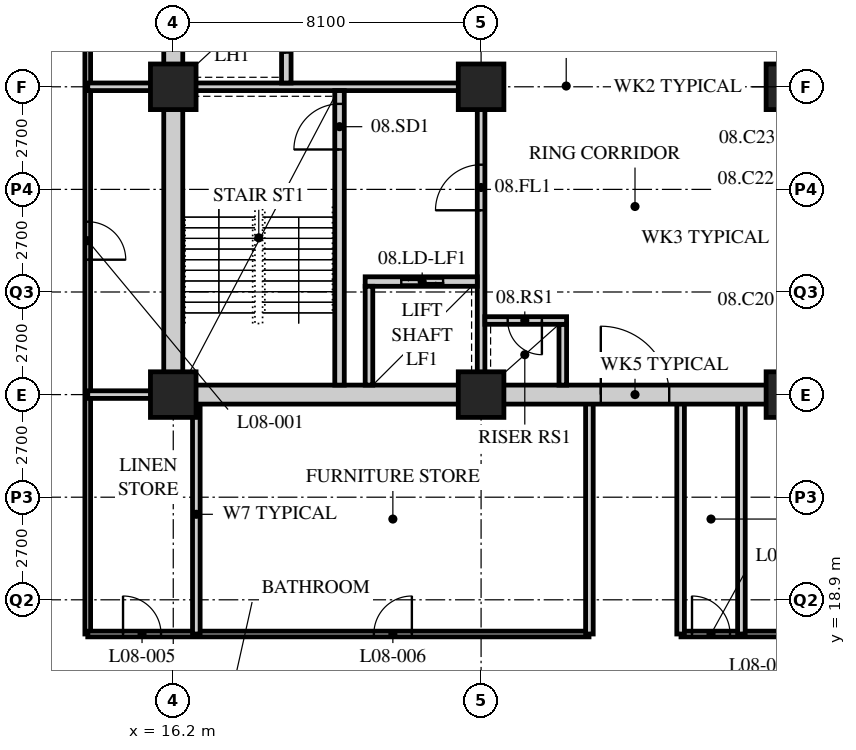
"""IFC4 building model, lengths in metres.
Left out: names, types, materials, properties, quantities, classifications, styles, units other than length and angle.
Written with IfcOpenShell. Run it as: python <this file> out.ifc"""

import sys

from ifc_helpers import new_model, si_unit, direction, frame, frame_2d, origin, origin_2d, place, context, subcontext, project, spatial, rectangle, hollow_rectangle, extrude, element, fill, save


model = new_model("IFC4")
c1 = context("Model", 3, precision=1e-05, world=origin(), true_north=direction((0.0, 1.0)))
c2 = subcontext(c1, "Body", "Model", "MODEL_VIEW")
j1 = project(units=[si_unit("LENGTHUNIT", "METRE"), si_unit("PLANEANGLEUNIT", "RADIAN")], contexts=[c1])
p1 = place(None, origin())
s1 = spatial("IfcSite", under=j1, at=p1, CompositionType="ELEMENT")
p2 = place(p1, origin())
s2 = spatial("IfcBuilding", under=s1, at=p2, CompositionType="ELEMENT")
p3 = place(p2, frame((0.0, 0.0, 39.8)))
s3 = spatial("IfcBuildingStorey", under=s2, at=p3, CompositionType="ELEMENT", Elevation=39.8)
for number, where, z_axis, x_axis in (
    (1, (16.2, 24.3, 0.0), (0.0, 0.0, 1.0), (1.0, 0.0, 0.0)),
    (2, (16.2, 32.4, 0.0), (0.0, 0.0, 1.0), (1.0, 0.0, 0.0)),
    (3, (24.3, 24.3, 0.0), (0.0, 0.0, 1.0), (1.0, 0.0, 0.0)),
    (4, (24.3, 32.4, 0.0), (0.0, 0.0, 1.0), (1.0, 0.0, 0.0)),
    (5, (32.4, 24.3, 0.0), (0.0, 0.0, 1.0), (1.0, 0.0, 0.0)),
    (6, (32.4, 32.4, 0.0), (0.0, 0.0, 1.0), (1.0, 0.0, 0.0)),
):
    element("IfcColumn", number, at=place(p3, frame(where, z_axis=z_axis, x_axis=x_axis)), inside=s3, PredefinedType="COLUMN", context=c2, shape_type="SweptSolid", body=[
        extrude(hollow_rectangle(XDim=1.2, YDim=1.2, WallThickness=0.12, at=origin_2d()), origin(), (0.0, 0.0, 1.0), 3.4),
    ])
p4 = place(p3, frame((13.95, 40.5, 0.0), z_axis=(0.0, 0.0, 1.0), x_axis=(0.0, -1.0, 0.0)))
e7 = element("IfcWall", 7, at=p4, inside=s3, PredefinedType="PARTITIONING", context=c2, shape_type="SweptSolid", body=[
    extrude(rectangle(XDim=22.5, YDim=0.15, at=frame_2d((11.25, 0.0))), origin(), (0.0, 0.0, 1.0), 3.19),
])
p5 = place(p4, frame((11.65, 0.0, 0.0)))
e8 = element("IfcOpeningElement", 8, at=p5, cuts=e7, PredefinedType="OPENING", context=c2, shape_type="SweptSolid", body=[
    extrude(rectangle(XDim=1.0, YDim=2.1, at=frame_2d((0.5, 1.05))), frame((0.0, 0.085, 0.0), z_axis=(0.0, -1.0, 0.0), x_axis=(1.0, 0.0, 0.0)), (0.0, 0.0, 1.0), 0.17),
])
p6 = place(p4, frame((3.55, 0.0, 0.0)))
e9 = element("IfcOpeningElement", 9, at=p6, cuts=e7, PredefinedType="OPENING", context=c2, shape_type="SweptSolid", body=[
    extrude(rectangle(XDim=1.0, YDim=2.1, at=frame_2d((0.5, 1.05))), frame((0.0, 0.085, 0.0), z_axis=(0.0, -1.0, 0.0), x_axis=(1.0, 0.0, 0.0)), (0.0, 0.0, 1.0), 0.17),
])
p7 = place(p3, frame((13.95, 18.0, 0.0), z_axis=(0.0, 0.0, 1.0), x_axis=(1.0, 0.0, 0.0)))
e10 = element("IfcWall", 10, at=p7, inside=s3, PredefinedType="PARTITIONING", context=c2, shape_type="SweptSolid", body=[
    extrude(rectangle(XDim=13.19, YDim=0.15, at=frame_2d((6.595, 0.0))), origin(), (0.0, 0.0, 1.0), 3.19),
])
p8 = place(p7, frame((0.929, 0.0, 0.0)))
e11 = element("IfcOpeningElement", 11, at=p8, cuts=e10, PredefinedType="OPENING", context=c2, shape_type="SweptSolid", body=[
    extrude(rectangle(XDim=1.0, YDim=2.1, at=frame_2d((0.5, 1.05))), frame((0.0, 0.085, 0.0), z_axis=(0.0, -1.0, 0.0), x_axis=(1.0, 0.0, 0.0)), (0.0, 0.0, 1.0), 0.17),
])
p9 = place(p7, frame((7.529, 0.0, 0.0)))
e12 = element("IfcOpeningElement", 12, at=p9, cuts=e10, PredefinedType="OPENING", context=c2, shape_type="SweptSolid", body=[
    extrude(rectangle(XDim=1.0, YDim=2.1, at=frame_2d((0.5, 1.05))), frame((0.0, 0.085, 0.0), z_axis=(0.0, -1.0, 0.0), x_axis=(1.0, 0.0, 0.0)), (0.0, 0.0, 1.0), 0.17),
])
p10 = place(p3, frame((29.56, 18.0, 0.0), z_axis=(0.0, 0.0, 1.0), x_axis=(1.0, 0.0, 0.0)))
e13 = element("IfcWall", 13, at=p10, inside=s3, PredefinedType="PARTITIONING", context=c2, shape_type="SweptSolid", body=[
    extrude(rectangle(XDim=13.19, YDim=0.15, at=frame_2d((6.595, 0.0))), origin(), (0.0, 0.0, 1.0), 3.19),
])
p11 = place(p10, frame((0.29, 0.0, 0.0)))
e14 = element("IfcOpeningElement", 14, at=p11, cuts=e13, PredefinedType="OPENING", context=c2, shape_type="SweptSolid", body=[
    extrude(rectangle(XDim=1.0, YDim=2.1, at=frame_2d((0.5, 1.05))), frame((0.0, 0.085, 0.0), z_axis=(0.0, -1.0, 0.0), x_axis=(1.0, 0.0, 0.0)), (0.0, 0.0, 1.0), 0.17),
])
p12 = place(p10, frame((6.89, 0.0, 0.0)))
e15 = element("IfcOpeningElement", 15, at=p12, cuts=e13, PredefinedType="OPENING", context=c2, shape_type="SweptSolid", body=[
    extrude(rectangle(XDim=1.0, YDim=2.1, at=frame_2d((0.5, 1.05))), frame((0.0, 0.085, 0.0), z_axis=(0.0, -1.0, 0.0), x_axis=(1.0, 0.0, 0.0)), (0.0, 0.0, 1.0), 0.17),
])
p13 = place(p3, frame((13.95, 32.4, 0.0), z_axis=(0.0, 0.0, 1.0), x_axis=(1.0, 0.0, 0.0)))
e16 = element("IfcWall", 16, at=p13, inside=s3, PredefinedType="SOLIDWALL", context=c2, shape_type="SweptSolid", body=[
    extrude(rectangle(XDim=2.25, YDim=0.2, at=frame_2d((1.125, 0.0))), origin(), (0.0, 0.0, 1.0), 2.578),
])
for number, where, z_axis, x_axis in (
    (17, (16.807, 18.0, 0.0), (0.0, 0.0, 1.0), (0.0, 1.0, 0.0)),
    (18, (31.15, 18.0, 0.0), (0.0, 0.0, 1.0), (0.0, 1.0, 0.0)),
    (19, (27.15, 18.0, 0.0), (0.0, 0.0, 1.0), (0.0, 1.0, 0.0)),
    (20, (29.55, 18.0, 0.0), (0.0, 0.0, 1.0), (0.0, 1.0, 0.0)),
):
    element("IfcWall", number, at=place(p3, frame(where, z_axis=z_axis, x_axis=x_axis)), inside=s3, PredefinedType="SOLIDWALL", context=c2, shape_type="SweptSolid", body=[
        extrude(rectangle(XDim=6.3, YDim=0.2, at=frame_2d((3.15, 0.0))), origin(), (0.0, 0.0, 1.0), 3.19),
    ])
p14 = place(p3, frame((13.95, 24.3, 0.0), z_axis=(0.0, 0.0, 1.0), x_axis=(1.0, 0.0, 0.0)))
e21 = element("IfcWall", 21, at=p14, inside=s3, PredefinedType="SOLIDWALL", context=c2, shape_type="SweptSolid", body=[
    extrude(rectangle(XDim=2.25, YDim=0.2, at=frame_2d((1.125, 0.0))), origin(), (0.0, 0.0, 1.0), 2.578),
])
p15 = place(p3, frame((15.95, 24.3, 0.0), z_axis=(0.0, 0.0, 1.0), x_axis=(1.0, 0.0, 0.0)))
e22 = element("IfcWall", 22, at=p15, inside=s3, PredefinedType="SOLIDWALL", context=c2, shape_type="SweptSolid", body=[
    extrude(rectangle(XDim=24.8, YDim=0.5, at=frame_2d((12.4, 0.0))), origin(), (0.0, 0.0, 1.0), 2.54),
])
p16 = place(p15, frame((11.5, 0.0, 0.0)))
e23 = element("IfcOpeningElement", 23, at=p16, cuts=e22, PredefinedType="OPENING", context=c2, shape_type="SweptSolid", body=[
    extrude(rectangle(XDim=1.8, YDim=2.4, at=frame_2d((0.9, 1.2))), frame((0.0, 0.26, 0.0), z_axis=(0.0, -1.0, 0.0), x_axis=(1.0, 0.0, 0.0)), (0.0, 0.0, 1.0), 0.52),
])
p17 = place(p3, frame((16.2, 24.55, 0.0), z_axis=(0.0, 0.0, 1.0), x_axis=(0.0, 1.0, 0.0)))
e24 = element("IfcWall", 24, at=p17, inside=s3, PredefinedType="SOLIDWALL", context=c2, shape_type="SweptSolid", body=[
    extrude(rectangle(XDim=15.7, YDim=0.5, at=frame_2d((7.85, 0.0))), origin(), (0.0, 0.0, 1.0), 2.578),
])
p18 = place(p3, frame((16.45, 32.4, 0.0), z_axis=(0.0, 0.0, 1.0), x_axis=(1.0, 0.0, 0.0)))
e25 = element("IfcWall", 25, at=p18, inside=s3, PredefinedType="SOLIDWALL", context=c2, shape_type="SweptSolid", body=[
    extrude(rectangle(XDim=7.95, YDim=0.2, at=frame_2d((3.975, 0.0))), origin(), (0.0, 0.0, 1.0), 2.578),
])
p19 = place(p3, frame((24.3, 24.55, 0.0), z_axis=(0.0, 0.0, 1.0), x_axis=(0.0, 1.0, 0.0)))
e26 = element("IfcWall", 26, at=p19, inside=s3, PredefinedType="SOLIDWALL", context=c2, shape_type="SweptSolid", body=[
    extrude(rectangle(XDim=7.75, YDim=0.2, at=frame_2d((3.875, 0.0))), origin(), (0.0, 0.0, 1.0), 2.578),
])
p20 = place(p19, frame((4.6, 0.0, 0.0)))
e27 = element("IfcOpeningElement", 27, at=p20, cuts=e26, PredefinedType="OPENING", context=c2, shape_type="SweptSolid", body=[
    extrude(rectangle(XDim=1.2, YDim=2.1, at=frame_2d((0.6, 1.05))), frame((0.0, 0.11, 0.0), z_axis=(0.0, -1.0, 0.0), x_axis=(1.0, 0.0, 0.0)), (0.0, 0.0, 1.0), 0.22),
])
p21 = place(p3, frame((20.575, 24.55, 0.0), z_axis=(0.0, 0.0, 1.0), x_axis=(0.0, 1.0, 0.0)))
e28 = element("IfcWall", 28, at=p21, inside=s3, PredefinedType="SOLIDWALL", context=c2, shape_type="SweptSolid", body=[
    extrude(rectangle(XDim=7.75, YDim=0.25, at=frame_2d((3.875, 0.0))), origin(), (0.0, 0.0, 1.0), 3.19),
])
p22 = place(p21, frame((6.2, 0.0, 0.0)))
e29 = element("IfcOpeningElement", 29, at=p22, cuts=e28, PredefinedType="OPENING", context=c2, shape_type="SweptSolid", body=[
    extrude(rectangle(XDim=1.2, YDim=2.1, at=frame_2d((0.6, 1.05))), frame((0.0, 0.135, 0.0), z_axis=(0.0, -1.0, 0.0), x_axis=(1.0, 0.0, 0.0)), (0.0, 0.0, 1.0), 0.27),
])
p23 = place(p3, frame((21.25, 27.275, 0.0), z_axis=(0.0, 0.0, 1.0), x_axis=(1.0, 0.0, 0.0)))
e30 = element("IfcWall", 30, at=p23, inside=s3, PredefinedType="SOLIDWALL", context=c2, shape_type="SweptSolid", body=[
    extrude(rectangle(XDim=2.95, YDim=0.25, at=frame_2d((1.475, 0.0))), origin(), (0.0, 0.0, 1.0), 3.19),
])
p24 = place(p23, frame((0.95, 0.0, 0.0)))
e31 = element("IfcOpeningElement", 31, at=p24, cuts=e30, PredefinedType="OPENING", context=c2, shape_type="SweptSolid", body=[
    extrude(rectangle(XDim=1.1, YDim=2.4, at=frame_2d((0.55, 1.2))), frame((0.0, 0.135, 0.0), z_axis=(0.0, -1.0, 0.0), x_axis=(1.0, 0.0, 0.0)), (0.0, 0.0, 1.0), 0.27),
])
p25 = place(p3, frame((21.35, 24.55, 0.0), z_axis=(0.0, 0.0, 1.0), x_axis=(0.0, 1.0, 0.0)))
e32 = element("IfcWall", 32, at=p25, inside=s3, PredefinedType="SOLIDWALL", context=c2, shape_type="SweptSolid", body=[
    extrude(rectangle(XDim=2.6, YDim=0.2, at=frame_2d((1.3, 0.0))), origin(), (0.0, 0.0, 1.0), 3.19),
])
p26 = place(p3, frame((19.175, 32.5, 0.0), z_axis=(0.0, 0.0, 1.0), x_axis=(0.0, 1.0, 0.0)))
e33 = element("IfcWall", 33, at=p26, inside=s3, PredefinedType="SOLIDWALL", context=c2, shape_type="SweptSolid", body=[
    extrude(rectangle(XDim=7.75, YDim=0.25, at=frame_2d((3.875, 0.0))), origin(), (0.0, 0.0, 1.0), 3.19),
])
p27 = place(p26, frame((0.8, 0.0, 0.0)))
e34 = element("IfcOpeningElement", 34, at=p27, cuts=e33, PredefinedType="OPENING", context=c2, shape_type="SweptSolid", body=[
    extrude(rectangle(XDim=1.1, YDim=2.4, at=frame_2d((0.55, 1.2))), frame((0.0, 0.135, 0.0), z_axis=(0.0, -1.0, 0.0), x_axis=(1.0, 0.0, 0.0)), (0.0, 0.0, 1.0), 0.27),
])
p28 = place(p26, frame((3.4, 0.0, 0.0)))
e35 = element("IfcOpeningElement", 35, at=p28, cuts=e33, PredefinedType="OPENING", context=c2, shape_type="SweptSolid", body=[
    extrude(rectangle(XDim=1.1, YDim=2.4, at=frame_2d((0.55, 1.2))), frame((0.0, 0.135, 0.0), z_axis=(0.0, -1.0, 0.0), x_axis=(1.0, 0.0, 0.0)), (0.0, 0.0, 1.0), 0.27),
])
p29 = place(p26, frame((6.0, 0.0, 0.0)))
e36 = element("IfcOpeningElement", 36, at=p29, cuts=e33, PredefinedType="OPENING", context=c2, shape_type="SweptSolid", body=[
    extrude(rectangle(XDim=1.1, YDim=2.4, at=frame_2d((0.55, 1.2))), frame((0.0, 0.135, 0.0), z_axis=(0.0, -1.0, 0.0), x_axis=(1.0, 0.0, 0.0)), (0.0, 0.0, 1.0), 0.27),
])
p30 = place(p3, frame((26.45, 24.55, 0.0), z_axis=(0.0, 0.0, 1.0), x_axis=(0.0, 1.0, 0.0)))
e37 = element("IfcWall", 37, at=p30, inside=s3, PredefinedType="SOLIDWALL", context=c2, shape_type="SweptSolid", body=[
    extrude(rectangle(XDim=1.6, YDim=0.2, at=frame_2d((0.8, 0.0))), origin(), (0.0, 0.0, 1.0), 3.19),
])
p31 = place(p3, frame((24.4, 26.25, 0.0), z_axis=(0.0, 0.0, 1.0), x_axis=(1.0, 0.0, 0.0)))
e38 = element("IfcWall", 38, at=p31, inside=s3, PredefinedType="SOLIDWALL", context=c2, shape_type="SweptSolid", body=[
    extrude(rectangle(XDim=2.15, YDim=0.2, at=frame_2d((1.075, 0.0))), origin(), (0.0, 0.0, 1.0), 3.19),
])
p32 = place(p31, frame((0.6, 0.0, 0.0)))
e39 = element("IfcOpeningElement", 39, at=p32, cuts=e38, PredefinedType="OPENING", context=c2, shape_type="SweptSolid", body=[
    extrude(rectangle(XDim=0.9, YDim=2.1, at=frame_2d((0.45, 1.05))), frame((0.0, 0.11, 0.0), z_axis=(0.0, -1.0, 0.0), x_axis=(1.0, 0.0, 0.0)), (0.0, 0.0, 1.0), 0.22),
])
p33 = place(p5, origin())
e40 = element("IfcDoor", 40, at=p33, inside=s3, OperationType="SINGLE_SWING_RIGHT", PredefinedType="DOOR", context=c2, shape_type="SweptSolid", body=[
    extrude(rectangle(XDim=1.0, YDim=2.1, at=frame_2d((0.5, 1.05))), frame((0.0, 0.025, 0.0), z_axis=(0.0, -1.0, 0.0), x_axis=(1.0, 0.0, 0.0)), (0.0, 0.0, 1.0), 0.05),
])
fill(e8, e40)
p34 = place(p8, origin())
e41 = element("IfcDoor", 41, at=p34, inside=s3, OperationType="SINGLE_SWING_LEFT", PredefinedType="DOOR", context=c2, shape_type="SweptSolid", body=[
    extrude(rectangle(XDim=1.0, YDim=2.1, at=frame_2d((0.5, 1.05))), frame((0.0, 0.025, 0.0), z_axis=(0.0, -1.0, 0.0), x_axis=(1.0, 0.0, 0.0)), (0.0, 0.0, 1.0), 0.05),
])
fill(e11, e41)
p35 = place(p9, origin())
e42 = element("IfcDoor", 42, at=p35, inside=s3, OperationType="SINGLE_SWING_RIGHT", PredefinedType="DOOR", context=c2, shape_type="SweptSolid", body=[
    extrude(rectangle(XDim=1.0, YDim=2.1, at=frame_2d((0.5, 1.05))), frame((0.0, 0.025, 0.0), z_axis=(0.0, -1.0, 0.0), x_axis=(1.0, 0.0, 0.0)), (0.0, 0.0, 1.0), 0.05),
])
fill(e12, e42)
p36 = place(p11, origin())
e43 = element("IfcDoor", 43, at=p36, inside=s3, OperationType="SINGLE_SWING_LEFT", PredefinedType="DOOR", context=c2, shape_type="SweptSolid", body=[
    extrude(rectangle(XDim=1.0, YDim=2.1, at=frame_2d((0.5, 1.05))), frame((0.0, 0.025, 0.0), z_axis=(0.0, -1.0, 0.0), x_axis=(1.0, 0.0, 0.0)), (0.0, 0.0, 1.0), 0.05),
])
fill(e14, e43)
p37 = place(p22, origin())
e44 = element("IfcDoor", 44, at=p37, inside=s3, OperationType="SINGLE_SWING_LEFT", PredefinedType="DOOR", context=c2, shape_type="SweptSolid", body=[
    extrude(rectangle(XDim=1.2, YDim=2.1, at=frame_2d((0.6, 1.05))), frame((0.0, 0.025, 0.0), z_axis=(0.0, -1.0, 0.0), x_axis=(1.0, 0.0, 0.0)), (0.0, 0.0, 1.0), 0.05),
])
fill(e29, e44)
p38 = place(p20, origin())
e45 = element("IfcDoor", 45, at=p38, inside=s3, OperationType="SINGLE_SWING_LEFT", PredefinedType="DOOR", context=c2, shape_type="SweptSolid", body=[
    extrude(rectangle(XDim=1.2, YDim=2.1, at=frame_2d((0.6, 1.05))), frame((0.0, 0.025, 0.0), z_axis=(0.0, -1.0, 0.0), x_axis=(1.0, 0.0, 0.0)), (0.0, 0.0, 1.0), 0.05),
])
fill(e27, e45)
p39 = place(p32, origin())
e46 = element("IfcDoor", 46, at=p39, inside=s3, OperationType="SINGLE_SWING_LEFT", PredefinedType="DOOR", context=c2, shape_type="SweptSolid", body=[
    extrude(rectangle(XDim=0.9, YDim=2.1, at=frame_2d((0.45, 1.05))), frame((0.0, 0.025, 0.0), z_axis=(0.0, -1.0, 0.0), x_axis=(1.0, 0.0, 0.0)), (0.0, 0.0, 1.0), 0.05),
])
fill(e39, e46)
p40 = place(p27, origin())
e47 = element("IfcDoor", 47, at=p40, inside=s3, OperationType="DOUBLE_DOOR_SLIDING", PredefinedType="DOOR", context=c2, shape_type="SweptSolid", body=[
    extrude(rectangle(XDim=1.1, YDim=2.4, at=frame_2d((0.55, 1.2))), frame((0.0, 0.025, 0.0), z_axis=(0.0, -1.0, 0.0), x_axis=(1.0, 0.0, 0.0)), (0.0, 0.0, 1.0), 0.05),
])
fill(e34, e47)
p41 = place(p24, origin())
e48 = element("IfcDoor", 48, at=p41, inside=s3, OperationType="DOUBLE_DOOR_SLIDING", PredefinedType="DOOR", context=c2, shape_type="SweptSolid", body=[
    extrude(rectangle(XDim=1.1, YDim=2.4, at=frame_2d((0.55, 1.2))), frame((0.0, 0.025, 0.0), z_axis=(0.0, -1.0, 0.0), x_axis=(1.0, 0.0, 0.0)), (0.0, 0.0, 1.0), 0.05),
])
fill(e31, e48)
p42 = place(p16, origin())
e49 = element("IfcDoor", 49, at=p42, inside=s3, OperationType="DOUBLE_DOOR_SINGLE_SWING", PredefinedType="DOOR", context=c2, shape_type="SweptSolid", body=[
    extrude(rectangle(XDim=1.8, YDim=2.4, at=frame_2d((0.9, 1.2))), frame((0.0, 0.025, 0.0), z_axis=(0.0, -1.0, 0.0), x_axis=(1.0, 0.0, 0.0)), (0.0, 0.0, 1.0), 0.05),
])
fill(e23, e49)
save(model, sys.argv[1])
